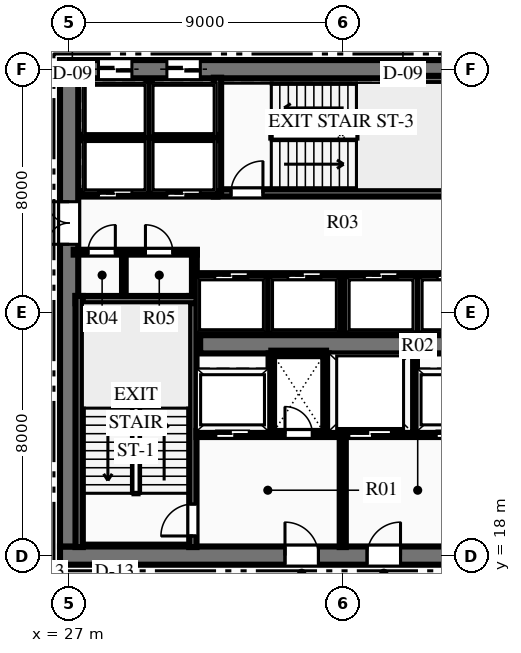
"""IFC4 building model, lengths in metres.
Left out: names, types, materials, properties, quantities, classifications, styles, units other than length and angle.
Written with IfcOpenShell. Run it as: python <this file> out.ifc"""

import sys

from ifc_helpers import new_model, si_unit, direction, frame, frame_2d, origin, place, context, subcontext, project, spatial, rectangle, extrude, element, fill, save


model = new_model("IFC4")
c1 = context("Model", 3, precision=1e-05, world=origin(), true_north=direction((0.0, 1.0)))
c2 = subcontext(c1, "Body", "Model", "MODEL_VIEW")
j1 = project(units=[si_unit("LENGTHUNIT", "METRE"), si_unit("PLANEANGLEUNIT", "RADIAN")], contexts=[c1])
p1 = place(None, origin())
s1 = spatial("IfcSite", under=j1, at=p1, CompositionType="ELEMENT")
p2 = place(p1, origin())
s2 = spatial("IfcBuilding", under=s1, at=p2, CompositionType="ELEMENT")
p3 = place(p2, frame((0.0, 0.0, 66.45)))
s3 = spatial("IfcBuildingStorey", under=s2, at=p3, CompositionType="ELEMENT", Elevation=66.45)
p4 = place(p3, frame((26.7, 18.0, 0.0), z_axis=(0.0, 0.0, 1.0), x_axis=(1.0, 0.0, 0.0)))
e1 = element("IfcWall", 1, at=p4, inside=s3, PredefinedType="SHEAR", context=c2, shape_type="SweptSolid", body=[
    extrude(rectangle(XDim=18.6, YDim=0.6, at=frame_2d((9.3, 0.0))), origin(), (0.0, 0.0, 1.0), 3.75),
])
p5 = place(p4, frame((7.4, 0.0, 0.0)))
e2 = element("IfcOpeningElement", 2, at=p5, cuts=e1, PredefinedType="OPENING", context=c2, shape_type="SweptSolid", body=[
    extrude(rectangle(XDim=1.1, YDim=2.15, at=frame_2d((0.55, 1.075))), frame((0.0, 0.31, 0.0), z_axis=(0.0, -1.0, 0.0), x_axis=(1.0, 0.0, 0.0)), (0.0, 0.0, 1.0), 0.62),
])
p6 = place(p4, frame((10.1, 0.0, 0.0)))
e3 = element("IfcOpeningElement", 3, at=p6, cuts=e1, PredefinedType="OPENING", context=c2, shape_type="SweptSolid", body=[
    extrude(rectangle(XDim=1.1, YDim=2.15, at=frame_2d((0.55, 1.075))), frame((0.0, 0.31, 0.0), z_axis=(0.0, -1.0, 0.0), x_axis=(1.0, 0.0, 0.0)), (0.0, 0.0, 1.0), 0.62),
])
p7 = place(p3, frame((26.7, 34.0, 0.0), z_axis=(0.0, 0.0, 1.0), x_axis=(1.0, 0.0, 0.0)))
e4 = element("IfcWall", 4, at=p7, inside=s3, PredefinedType="SHEAR", context=c2, shape_type="SweptSolid", body=[
    extrude(rectangle(XDim=18.6, YDim=0.6, at=frame_2d((9.3, 0.0))), origin(), (0.0, 0.0, 1.0), 3.75),
])
p8 = place(p7, frame((1.265, 0.0, 0.0)))
e5 = element("IfcOpeningElement", 5, at=p8, cuts=e4, PredefinedType="OPENING", context=c2, shape_type="SweptSolid", body=[
    extrude(rectangle(XDim=1.1, YDim=2.15, at=frame_2d((0.55, 1.075))), frame((0.0, 0.31, 0.0), z_axis=(0.0, -1.0, 0.0), x_axis=(1.0, 0.0, 0.0)), (0.0, 0.0, 1.0), 0.62),
])
p9 = place(p7, frame((3.515, 0.0, 0.0)))
e6 = element("IfcOpeningElement", 6, at=p9, cuts=e4, PredefinedType="OPENING", context=c2, shape_type="SweptSolid", body=[
    extrude(rectangle(XDim=1.1, YDim=2.15, at=frame_2d((0.55, 1.075))), frame((0.0, 0.31, 0.0), z_axis=(0.0, -1.0, 0.0), x_axis=(1.0, 0.0, 0.0)), (0.0, 0.0, 1.0), 0.62),
])
p10 = place(p7, frame((13.985, 0.0, 0.0)))
e7 = element("IfcOpeningElement", 7, at=p10, cuts=e4, PredefinedType="OPENING", context=c2, shape_type="SweptSolid", body=[
    extrude(rectangle(XDim=1.1, YDim=2.15, at=frame_2d((0.55, 1.075))), frame((0.0, 0.31, 0.0), z_axis=(0.0, -1.0, 0.0), x_axis=(1.0, 0.0, 0.0)), (0.0, 0.0, 1.0), 0.62),
])
p11 = place(p7, frame((16.235, 0.0, 0.0)))
e8 = element("IfcOpeningElement", 8, at=p11, cuts=e4, PredefinedType="OPENING", context=c2, shape_type="SweptSolid", body=[
    extrude(rectangle(XDim=1.1, YDim=2.15, at=frame_2d((0.55, 1.075))), frame((0.0, 0.31, 0.0), z_axis=(0.0, -1.0, 0.0), x_axis=(1.0, 0.0, 0.0)), (0.0, 0.0, 1.0), 0.62),
])
p12 = place(p3, frame((27.0, 18.3, 0.0), z_axis=(0.0, 0.0, 1.0), x_axis=(0.0, 1.0, 0.0)))
e9 = element("IfcWall", 9, at=p12, inside=s3, PredefinedType="SHEAR", context=c2, shape_type="SweptSolid", body=[
    extrude(rectangle(XDim=15.4, YDim=0.6, at=frame_2d((7.7, 0.0))), origin(), (0.0, 0.0, 1.0), 3.75),
])
p13 = place(p12, frame((9.94, 0.0, 0.0)))
e10 = element("IfcOpeningElement", 10, at=p13, cuts=e9, PredefinedType="OPENING", context=c2, shape_type="SweptSolid", body=[
    extrude(rectangle(XDim=1.4, YDim=2.2, at=frame_2d((0.7, 1.1))), frame((0.0, 0.31, 0.0), z_axis=(0.0, -1.0, 0.0), x_axis=(1.0, 0.0, 0.0)), (0.0, 0.0, 1.0), 0.62),
])
p14 = place(p3, frame((31.31, 24.95, 0.0), z_axis=(0.0, 0.0, 1.0), x_axis=(1.0, 0.0, 0.0)))
e11 = element("IfcWall", 11, at=p14, inside=s3, PredefinedType="SHEAR", context=c2, shape_type="SweptSolid", body=[
    extrude(rectangle(XDim=9.38, YDim=0.6, at=frame_2d((4.69, 0.0))), origin(), (0.0, 0.0, 1.0), 3.75),
])
p15 = place(p3, frame((31.07, 18.28, 0.0), z_axis=(0.0, 0.0, 1.0), x_axis=(0.0, 1.0, 0.0)))
e12 = element("IfcWall", 12, at=p15, inside=s3, PredefinedType="SHEAR", context=c2, shape_type="SweptSolid", body=[
    extrude(rectangle(XDim=8.26, YDim=0.24, at=frame_2d((4.13, 0.0))), origin(), (0.0, 0.0, 1.0), 3.75),
])
p16 = place(p15, frame((0.365, 0.0, 0.0)))
e13 = element("IfcOpeningElement", 13, at=p16, cuts=e12, PredefinedType="OPENING", context=c2, shape_type="SweptSolid", body=[
    extrude(rectangle(XDim=1.05, YDim=2.15, at=frame_2d((0.525, 1.075))), frame((0.0, 0.13, 0.0), z_axis=(0.0, -1.0, 0.0), x_axis=(1.0, 0.0, 0.0)), (0.0, 0.0, 1.0), 0.26),
])
p17 = place(p3, frame((27.21, 26.42, 0.0), z_axis=(0.0, 0.0, 1.0), x_axis=(1.0, 0.0, 0.0)))
e14 = element("IfcWall", 14, at=p17, inside=s3, PredefinedType="SHEAR", context=c2, shape_type="SweptSolid", body=[
    extrude(rectangle(XDim=3.98, YDim=0.24, at=frame_2d((1.99, 0.0))), origin(), (0.0, 0.0, 1.0), 3.75),
])
p18 = place(p3, frame((27.33, 18.28, 0.0), z_axis=(0.0, 0.0, 1.0), x_axis=(0.0, 1.0, 0.0)))
e15 = element("IfcWall", 15, at=p18, inside=s3, PredefinedType="SHEAR", context=c2, shape_type="SweptSolid", body=[
    extrude(rectangle(XDim=8.26, YDim=0.24, at=frame_2d((4.13, 0.0))), origin(), (0.0, 0.0, 1.0), 3.75),
])
p19 = place(p3, frame((31.76, 29.93, 0.0), z_axis=(0.0, 0.0, 1.0), x_axis=(1.0, 0.0, 0.0)))
e16 = element("IfcWall", 16, at=p19, inside=s3, PredefinedType="SHEAR", context=c2, shape_type="SweptSolid", body=[
    extrude(rectangle(XDim=8.38, YDim=0.24, at=frame_2d((4.19, 0.0))), origin(), (0.0, 0.0, 1.0), 3.75),
])
p20 = place(p19, frame((0.565, 0.0, 0.0)))
e17 = element("IfcOpeningElement", 17, at=p20, cuts=e16, PredefinedType="OPENING", context=c2, shape_type="SweptSolid", body=[
    extrude(rectangle(XDim=1.05, YDim=2.15, at=frame_2d((0.525, 1.075))), frame((0.0, 0.13, 0.0), z_axis=(0.0, -1.0, 0.0), x_axis=(1.0, 0.0, 0.0)), (0.0, 0.0, 1.0), 0.26),
])
p21 = place(p3, frame((31.88, 29.93, 0.0), z_axis=(0.0, 0.0, 1.0), x_axis=(0.0, 1.0, 0.0)))
e18 = element("IfcWall", 18, at=p21, inside=s3, PredefinedType="SHEAR", context=c2, shape_type="SweptSolid", body=[
    extrude(rectangle(XDim=3.79, YDim=0.24, at=frame_2d((1.895, 0.0))), origin(), (0.0, 0.0, 1.0), 3.75),
])
p22 = place(p3, frame((37.85, 33.66, 0.0), z_axis=(0.0, 0.0, 1.0), x_axis=(1.0, 0.0, 0.0)))
e19 = element("IfcWall", 19, at=p22, inside=s3, PredefinedType="SHEAR", context=c2, shape_type="SweptSolid", body=[
    extrude(rectangle(XDim=2.29, YDim=0.24, at=frame_2d((1.145, 0.0))), origin(), (0.0, 0.0, 1.0), 3.75),
])
p23 = place(p3, frame((36.0, 18.28, 0.0), z_axis=(0.0, 0.0, 1.0), x_axis=(0.0, 1.0, 0.0)))
e20 = element("IfcWall", 20, at=p23, inside=s3, PredefinedType="PARTITIONING", context=c2, shape_type="SweptSolid", body=[
    extrude(rectangle(XDim=3.77, YDim=0.2, at=frame_2d((1.885, 0.0))), origin(), (0.0, 0.0, 1.0), 3.44),
])
p24 = place(p3, frame((31.19, 22.0, 0.0), z_axis=(0.0, 0.0, 1.0), x_axis=(1.0, 0.0, 0.0)))
e21 = element("IfcWall", 21, at=p24, inside=s3, PredefinedType="PARTITIONING", context=c2, shape_type="SweptSolid", body=[
    extrude(rectangle(XDim=4.69, YDim=0.2, at=frame_2d((2.345, 0.0))), origin(), (0.0, 0.0, 1.0), 3.44),
])
p25 = place(p24, frame((2.91, 0.0, 0.0)))
e22 = element("IfcOpeningElement", 22, at=p25, cuts=e21, PredefinedType="OPENING", context=c2, shape_type="SweptSolid", body=[
    extrude(rectangle(XDim=0.9, YDim=2.15, at=frame_2d((0.45, 1.075))), frame((0.0, 0.11, 0.0), z_axis=(0.0, -1.0, 0.0), x_axis=(1.0, 0.0, 0.0)), (0.0, 0.0, 1.0), 0.22),
])
p26 = place(p24, frame((0.635, 0.0, 0.0)))
e23 = element("IfcOpeningElement", 23, at=p26, cuts=e21, PredefinedType="OPENING", context=c2, shape_type="SweptSolid", body=[
    extrude(rectangle(XDim=1.1, YDim=2.15, at=frame_2d((0.55, 1.075))), frame((0.0, 0.11, 0.0), z_axis=(0.0, -1.0, 0.0), x_axis=(1.0, 0.0, 0.0)), (0.0, 0.0, 1.0), 0.22),
])
p27 = place(p3, frame((36.12, 22.0, 0.0), z_axis=(0.0, 0.0, 1.0), x_axis=(1.0, 0.0, 0.0)))
e24 = element("IfcWall", 24, at=p27, inside=s3, PredefinedType="PARTITIONING", context=c2, shape_type="SweptSolid", body=[
    extrude(rectangle(XDim=4.69, YDim=0.2, at=frame_2d((2.345, 0.0))), origin(), (0.0, 0.0, 1.0), 3.44),
])
p28 = place(p27, frame((2.955, 0.0, 0.0)))
e25 = element("IfcOpeningElement", 25, at=p28, cuts=e24, PredefinedType="OPENING", context=c2, shape_type="SweptSolid", body=[
    extrude(rectangle(XDim=1.1, YDim=2.15, at=frame_2d((0.55, 1.075))), frame((0.0, 0.11, 0.0), z_axis=(0.0, -1.0, 0.0), x_axis=(1.0, 0.0, 0.0)), (0.0, 0.0, 1.0), 0.22),
])
p29 = place(p27, frame((0.08, 0.0, 0.0)))
e26 = element("IfcOpeningElement", 26, at=p29, cuts=e24, PredefinedType="OPENING", context=c2, shape_type="SweptSolid", body=[
    extrude(rectangle(XDim=1.4, YDim=2.2, at=frame_2d((0.7, 1.1))), frame((0.0, 0.11, 0.0), z_axis=(0.0, -1.0, 0.0), x_axis=(1.0, 0.0, 0.0)), (0.0, 0.0, 1.0), 0.22),
])
for number, where, z_axis, x_axis in (
    (27, (33.65, 22.05, 0.0), (0.0, 0.0, 1.0), (0.0, 1.0, 0.0)),
    (28, (35.45, 22.05, 0.0), (0.0, 0.0, 1.0), (0.0, 1.0, 0.0)),
):
    element("IfcWall", number, at=place(p3, frame(where, z_axis=z_axis, x_axis=x_axis)), inside=s3, PredefinedType="PARTITIONING", context=c2, shape_type="SweptSolid", body=[
        extrude(rectangle(XDim=2.6, YDim=0.18, at=frame_2d((1.3, 0.0))), origin(), (0.0, 0.0, 1.0), 3.44),
    ])
p30 = place(p3, frame((33.65, 24.65, 0.0), z_axis=(0.0, 0.0, 1.0), x_axis=(1.0, 0.0, 0.0)))
e29 = element("IfcWall", 29, at=p30, inside=s3, PredefinedType="PARTITIONING", context=c2, shape_type="SweptSolid", body=[
    extrude(rectangle(XDim=1.8, YDim=0.18, at=frame_2d((0.9, 0.0))), origin(), (0.0, 0.0, 1.0), 3.44),
])
p31 = place(p3, frame((38.35, 22.05, 0.0), z_axis=(0.0, 0.0, 1.0), x_axis=(0.0, 1.0, 0.0)))
e30 = element("IfcWall", 30, at=p31, inside=s3, PredefinedType="PARTITIONING", context=c2, shape_type="SweptSolid", body=[
    extrude(rectangle(XDim=2.6, YDim=0.18, at=frame_2d((1.3, 0.0))), origin(), (0.0, 0.0, 1.0), 3.44),
])
p32 = place(p3, frame((27.15, 27.98, 0.0), z_axis=(0.0, 0.0, 1.0), x_axis=(1.0, 0.0, 0.0)))
e31 = element("IfcWall", 31, at=p32, inside=s3, PredefinedType="PARTITIONING", context=c2, shape_type="SweptSolid", body=[
    extrude(rectangle(XDim=4.05, YDim=0.16, at=frame_2d((2.025, 0.0))), origin(), (0.0, 0.0, 1.0), 3.44),
])
p33 = place(p32, frame((0.47, 0.0, 0.0)))
e32 = element("IfcOpeningElement", 32, at=p33, cuts=e31, PredefinedType="OPENING", context=c2, shape_type="SweptSolid", body=[
    extrude(rectangle(XDim=0.9, YDim=2.15, at=frame_2d((0.45, 1.075))), frame((0.0, 0.09, 0.0), z_axis=(0.0, -1.0, 0.0), x_axis=(1.0, 0.0, 0.0)), (0.0, 0.0, 1.0), 0.18),
])
p34 = place(p32, frame((2.36, 0.0, 0.0)))
e33 = element("IfcOpeningElement", 33, at=p34, cuts=e31, PredefinedType="OPENING", context=c2, shape_type="SweptSolid", body=[
    extrude(rectangle(XDim=0.9, YDim=2.15, at=frame_2d((0.45, 1.075))), frame((0.0, 0.09, 0.0), z_axis=(0.0, -1.0, 0.0), x_axis=(1.0, 0.0, 0.0)), (0.0, 0.0, 1.0), 0.18),
])
p35 = place(p3, frame((31.12, 26.54, 0.0), z_axis=(0.0, 0.0, 1.0), x_axis=(0.0, 1.0, 0.0)))
e34 = element("IfcWall", 34, at=p35, inside=s3, PredefinedType="PARTITIONING", context=c2, shape_type="SweptSolid", body=[
    extrude(rectangle(XDim=1.51, YDim=0.16, at=frame_2d((0.755, 0.0))), origin(), (0.0, 0.0, 1.0), 3.44),
])
p36 = place(p3, frame((28.8, 26.54, 0.0), z_axis=(0.0, 0.0, 1.0), x_axis=(0.0, 1.0, 0.0)))
e35 = element("IfcWall", 35, at=p36, inside=s3, PredefinedType="PARTITIONING", context=c2, shape_type="SweptSolid", body=[
    extrude(rectangle(XDim=1.44, YDim=0.12, at=frame_2d((0.72, 0.0))), origin(), (0.0, 0.0, 1.0), 3.44),
])
p37 = place(p3, frame((27.45, 29.9, 0.0), z_axis=(0.0, 0.0, 1.0), x_axis=(1.0, 0.0, 0.0)))
e36 = element("IfcWall", 36, at=p37, inside=s3, PredefinedType="PARTITIONING", context=c2, shape_type="SweptSolid", body=[
    extrude(rectangle(XDim=4.43, YDim=0.18, at=frame_2d((2.215, 0.0))), origin(), (0.0, 0.0, 1.0), 3.44),
])
p38 = place(p37, frame((0.515, 0.0, 0.0)))
e37 = element("IfcOpeningElement", 37, at=p38, cuts=e36, PredefinedType="OPENING", context=c2, shape_type="SweptSolid", body=[
    extrude(rectangle(XDim=1.1, YDim=2.15, at=frame_2d((0.55, 1.075))), frame((0.0, 0.1, 0.0), z_axis=(0.0, -1.0, 0.0), x_axis=(1.0, 0.0, 0.0)), (0.0, 0.0, 1.0), 0.2),
])
p39 = place(p37, frame((2.765, 0.0, 0.0)))
e38 = element("IfcOpeningElement", 38, at=p39, cuts=e36, PredefinedType="OPENING", context=c2, shape_type="SweptSolid", body=[
    extrude(rectangle(XDim=1.1, YDim=2.15, at=frame_2d((0.55, 1.075))), frame((0.0, 0.1, 0.0), z_axis=(0.0, -1.0, 0.0), x_axis=(1.0, 0.0, 0.0)), (0.0, 0.0, 1.0), 0.2),
])
p40 = place(p3, frame((27.45, 31.75, 0.0), z_axis=(0.0, 0.0, 1.0), x_axis=(1.0, 0.0, 0.0)))
e39 = element("IfcWall", 39, at=p40, inside=s3, PredefinedType="PARTITIONING", context=c2, shape_type="SweptSolid", body=[
    extrude(rectangle(XDim=4.43, YDim=0.18, at=frame_2d((2.215, 0.0))), origin(), (0.0, 0.0, 1.0), 3.44),
])
p41 = place(p3, frame((29.63, 29.9, 0.0), z_axis=(0.0, 0.0, 1.0), x_axis=(0.0, 1.0, 0.0)))
e40 = element("IfcWall", 40, at=p41, inside=s3, PredefinedType="PARTITIONING", context=c2, shape_type="SweptSolid", body=[
    extrude(rectangle(XDim=3.75, YDim=0.18, at=frame_2d((1.875, 0.0))), origin(), (0.0, 0.0, 1.0), 3.44),
])
p42 = place(p3, frame((31.2, 27.2, 0.0), z_axis=(0.0, 0.0, 1.0), x_axis=(1.0, 0.0, 0.0)))
e41 = element("IfcWall", 41, at=p42, inside=s3, PredefinedType="PARTITIONING", context=c2, shape_type="SweptSolid", body=[
    extrude(rectangle(XDim=9.6, YDim=0.18, at=frame_2d((4.8, 0.0))), origin(), (0.0, 0.0, 1.0), 3.44),
])
p43 = place(p42, frame((0.59, 0.0, 0.0)))
e42 = element("IfcOpeningElement", 42, at=p43, cuts=e41, PredefinedType="OPENING", context=c2, shape_type="SweptSolid", body=[
    extrude(rectangle(XDim=1.1, YDim=2.15, at=frame_2d((0.55, 1.075))), frame((0.0, 0.1, 0.0), z_axis=(0.0, -1.0, 0.0), x_axis=(1.0, 0.0, 0.0)), (0.0, 0.0, 1.0), 0.2),
])
p44 = place(p42, frame((2.99, 0.0, 0.0)))
e43 = element("IfcOpeningElement", 43, at=p44, cuts=e41, PredefinedType="OPENING", context=c2, shape_type="SweptSolid", body=[
    extrude(rectangle(XDim=1.1, YDim=2.15, at=frame_2d((0.55, 1.075))), frame((0.0, 0.1, 0.0), z_axis=(0.0, -1.0, 0.0), x_axis=(1.0, 0.0, 0.0)), (0.0, 0.0, 1.0), 0.2),
])
p45 = place(p42, frame((5.51, 0.0, 0.0)))
e44 = element("IfcOpeningElement", 44, at=p45, cuts=e41, PredefinedType="OPENING", context=c2, shape_type="SweptSolid", body=[
    extrude(rectangle(XDim=1.1, YDim=2.15, at=frame_2d((0.55, 1.075))), frame((0.0, 0.1, 0.0), z_axis=(0.0, -1.0, 0.0), x_axis=(1.0, 0.0, 0.0)), (0.0, 0.0, 1.0), 0.2),
])
p46 = place(p42, frame((7.91, 0.0, 0.0)))
e45 = element("IfcOpeningElement", 45, at=p46, cuts=e41, PredefinedType="OPENING", context=c2, shape_type="SweptSolid", body=[
    extrude(rectangle(XDim=1.1, YDim=2.15, at=frame_2d((0.55, 1.075))), frame((0.0, 0.1, 0.0), z_axis=(0.0, -1.0, 0.0), x_axis=(1.0, 0.0, 0.0)), (0.0, 0.0, 1.0), 0.2),
])
for number, where, z_axis, x_axis in (
    (46, (33.54, 25.3, 0.0), (0.0, 0.0, 1.0), (0.0, 1.0, 0.0)),
    (47, (36.0, 25.3, 0.0), (0.0, 0.0, 1.0), (0.0, 1.0, 0.0)),
    (48, (38.46, 25.3, 0.0), (0.0, 0.0, 1.0), (0.0, 1.0, 0.0)),
):
    element("IfcWall", number, at=place(p3, frame(where, z_axis=z_axis, x_axis=x_axis)), inside=s3, PredefinedType="PARTITIONING", context=c2, shape_type="SweptSolid", body=[
        extrude(rectangle(XDim=1.9, YDim=0.18, at=frame_2d((0.95, 0.0))), origin(), (0.0, 0.0, 1.0), 3.44),
    ])
p47 = place(p33, origin())
e49 = element("IfcDoor", 49, at=p47, inside=s3, OperationType="SINGLE_SWING_RIGHT", PredefinedType="DOOR", context=c2, shape_type="SweptSolid", body=[
    extrude(rectangle(XDim=0.9, YDim=2.15, at=frame_2d((0.45, 1.075))), frame((0.0, 0.025, 0.0), z_axis=(0.0, -1.0, 0.0), x_axis=(1.0, 0.0, 0.0)), (0.0, 0.0, 1.0), 0.05),
])
fill(e32, e49)
p48 = place(p34, origin())
e50 = element("IfcDoor", 50, at=p48, inside=s3, OperationType="SINGLE_SWING_LEFT", PredefinedType="DOOR", context=c2, shape_type="SweptSolid", body=[
    extrude(rectangle(XDim=0.9, YDim=2.15, at=frame_2d((0.45, 1.075))), frame((0.0, 0.025, 0.0), z_axis=(0.0, -1.0, 0.0), x_axis=(1.0, 0.0, 0.0)), (0.0, 0.0, 1.0), 0.05),
])
fill(e33, e50)
p49 = place(p16, origin())
e51 = element("IfcDoor", 51, at=p49, inside=s3, OperationType="SINGLE_SWING_LEFT", PredefinedType="DOOR", context=c2, shape_type="SweptSolid", body=[
    extrude(rectangle(XDim=1.05, YDim=2.15, at=frame_2d((0.525, 1.075))), frame((0.0, 0.025, 0.0), z_axis=(0.0, -1.0, 0.0), x_axis=(1.0, 0.0, 0.0)), (0.0, 0.0, 1.0), 0.05),
])
fill(e13, e51)
p50 = place(p20, origin())
e52 = element("IfcDoor", 52, at=p50, inside=s3, OperationType="SINGLE_SWING_RIGHT", PredefinedType="DOOR", context=c2, shape_type="SweptSolid", body=[
    extrude(rectangle(XDim=1.05, YDim=2.15, at=frame_2d((0.525, 1.075))), frame((0.0, 0.025, 0.0), z_axis=(0.0, -1.0, 0.0), x_axis=(1.0, 0.0, 0.0)), (0.0, 0.0, 1.0), 0.05),
])
fill(e17, e52)
p51 = place(p5, origin())
e53 = element("IfcDoor", 53, at=p51, inside=s3, OperationType="SINGLE_SWING_LEFT", PredefinedType="DOOR", context=c2, shape_type="SweptSolid", body=[
    extrude(rectangle(XDim=1.1, YDim=2.15, at=frame_2d((0.55, 1.075))), frame((0.0, 0.025, 0.0), z_axis=(0.0, -1.0, 0.0), x_axis=(1.0, 0.0, 0.0)), (0.0, 0.0, 1.0), 0.05),
])
fill(e2, e53)
p52 = place(p6, origin())
e54 = element("IfcDoor", 54, at=p52, inside=s3, OperationType="SINGLE_SWING_RIGHT", PredefinedType="DOOR", context=c2, shape_type="SweptSolid", body=[
    extrude(rectangle(XDim=1.1, YDim=2.15, at=frame_2d((0.55, 1.075))), frame((0.0, 0.025, 0.0), z_axis=(0.0, -1.0, 0.0), x_axis=(1.0, 0.0, 0.0)), (0.0, 0.0, 1.0), 0.05),
])
fill(e3, e54)
p53 = place(p25, origin())
e55 = element("IfcDoor", 55, at=p53, inside=s3, OperationType="SINGLE_SWING_LEFT", PredefinedType="DOOR", context=c2, shape_type="SweptSolid", body=[
    extrude(rectangle(XDim=0.9, YDim=2.15, at=frame_2d((0.45, 1.075))), frame((0.0, 0.025, 0.0), z_axis=(0.0, -1.0, 0.0), x_axis=(1.0, 0.0, 0.0)), (0.0, 0.0, 1.0), 0.05),
])
fill(e22, e55)
p54 = place(p13, origin())
e56 = element("IfcDoor", 56, at=p54, inside=s3, OperationType="DOUBLE_DOOR_SINGLE_SWING", PredefinedType="DOOR", context=c2, shape_type="SweptSolid", body=[
    extrude(rectangle(XDim=1.4, YDim=2.2, at=frame_2d((0.7, 1.1))), frame((0.0, 0.025, 0.0), z_axis=(0.0, -1.0, 0.0), x_axis=(1.0, 0.0, 0.0)), (0.0, 0.0, 1.0), 0.05),
])
fill(e10, e56)
p55 = place(p38, origin())
e57 = element("IfcDoor", 57, at=p55, inside=s3, OperationType="SLIDING_TO_LEFT", PredefinedType="DOOR", context=c2, shape_type="SweptSolid", body=[
    extrude(rectangle(XDim=1.1, YDim=2.15, at=frame_2d((0.55, 1.075))), frame((0.0, 0.025, 0.0), z_axis=(0.0, -1.0, 0.0), x_axis=(1.0, 0.0, 0.0)), (0.0, 0.0, 1.0), 0.05),
])
fill(e37, e57)
p56 = place(p39, origin())
e58 = element("IfcDoor", 58, at=p56, inside=s3, OperationType="SLIDING_TO_LEFT", PredefinedType="DOOR", context=c2, shape_type="SweptSolid", body=[
    extrude(rectangle(XDim=1.1, YDim=2.15, at=frame_2d((0.55, 1.075))), frame((0.0, 0.025, 0.0), z_axis=(0.0, -1.0, 0.0), x_axis=(1.0, 0.0, 0.0)), (0.0, 0.0, 1.0), 0.05),
])
fill(e38, e58)
p57 = place(p8, origin())
e59 = element("IfcDoor", 59, at=p57, inside=s3, OperationType="SLIDING_TO_LEFT", PredefinedType="DOOR", context=c2, shape_type="SweptSolid", body=[
    extrude(rectangle(XDim=1.1, YDim=2.15, at=frame_2d((0.55, 1.075))), frame((0.0, 0.025, 0.0), z_axis=(0.0, -1.0, 0.0), x_axis=(1.0, 0.0, 0.0)), (0.0, 0.0, 1.0), 0.05),
])
fill(e5, e59)
p58 = place(p9, origin())
e60 = element("IfcDoor", 60, at=p58, inside=s3, OperationType="SLIDING_TO_LEFT", PredefinedType="DOOR", context=c2, shape_type="SweptSolid", body=[
    extrude(rectangle(XDim=1.1, YDim=2.15, at=frame_2d((0.55, 1.075))), frame((0.0, 0.025, 0.0), z_axis=(0.0, -1.0, 0.0), x_axis=(1.0, 0.0, 0.0)), (0.0, 0.0, 1.0), 0.05),
])
fill(e6, e60)
p59 = place(p43, origin())
e61 = element("IfcDoor", 61, at=p59, inside=s3, OperationType="SLIDING_TO_LEFT", PredefinedType="DOOR", context=c2, shape_type="SweptSolid", body=[
    extrude(rectangle(XDim=1.1, YDim=2.15, at=frame_2d((0.55, 1.075))), frame((0.0, 0.025, 0.0), z_axis=(0.0, -1.0, 0.0), x_axis=(1.0, 0.0, 0.0)), (0.0, 0.0, 1.0), 0.05),
])
fill(e42, e61)
p60 = place(p44, origin())
e62 = element("IfcDoor", 62, at=p60, inside=s3, OperationType="SLIDING_TO_LEFT", PredefinedType="DOOR", context=c2, shape_type="SweptSolid", body=[
    extrude(rectangle(XDim=1.1, YDim=2.15, at=frame_2d((0.55, 1.075))), frame((0.0, 0.025, 0.0), z_axis=(0.0, -1.0, 0.0), x_axis=(1.0, 0.0, 0.0)), (0.0, 0.0, 1.0), 0.05),
])
fill(e43, e62)
p61 = place(p45, origin())
e63 = element("IfcDoor", 63, at=p61, inside=s3, OperationType="SLIDING_TO_LEFT", PredefinedType="DOOR", context=c2, shape_type="SweptSolid", body=[
    extrude(rectangle(XDim=1.1, YDim=2.15, at=frame_2d((0.55, 1.075))), frame((0.0, 0.025, 0.0), z_axis=(0.0, -1.0, 0.0), x_axis=(1.0, 0.0, 0.0)), (0.0, 0.0, 1.0), 0.05),
])
fill(e44, e63)
p62 = place(p46, origin())
e64 = element("IfcDoor", 64, at=p62, inside=s3, OperationType="SLIDING_TO_LEFT", PredefinedType="DOOR", context=c2, shape_type="SweptSolid", body=[
    extrude(rectangle(XDim=1.1, YDim=2.15, at=frame_2d((0.55, 1.075))), frame((0.0, 0.025, 0.0), z_axis=(0.0, -1.0, 0.0), x_axis=(1.0, 0.0, 0.0)), (0.0, 0.0, 1.0), 0.05),
])
fill(e45, e64)
p63 = place(p26, origin())
e65 = element("IfcDoor", 65, at=p63, inside=s3, OperationType="SLIDING_TO_LEFT", PredefinedType="DOOR", context=c2, shape_type="SweptSolid", body=[
    extrude(rectangle(XDim=1.1, YDim=2.15, at=frame_2d((0.55, 1.075))), frame((0.0, 0.025, 0.0), z_axis=(0.0, -1.0, 0.0), x_axis=(1.0, 0.0, 0.0)), (0.0, 0.0, 1.0), 0.05),
])
fill(e23, e65)
p64 = place(p28, origin())
e66 = element("IfcDoor", 66, at=p64, inside=s3, OperationType="SLIDING_TO_LEFT", PredefinedType="DOOR", context=c2, shape_type="SweptSolid", body=[
    extrude(rectangle(XDim=1.1, YDim=2.15, at=frame_2d((0.55, 1.075))), frame((0.0, 0.025, 0.0), z_axis=(0.0, -1.0, 0.0), x_axis=(1.0, 0.0, 0.0)), (0.0, 0.0, 1.0), 0.05),
])
fill(e25, e66)
p65 = place(p29, origin())
e67 = element("IfcDoor", 67, at=p65, inside=s3, OperationType="SLIDING_TO_LEFT", PredefinedType="DOOR", context=c2, shape_type="SweptSolid", body=[
    extrude(rectangle(XDim=1.4, YDim=2.2, at=frame_2d((0.7, 1.1))), frame((0.0, 0.025, 0.0), z_axis=(0.0, -1.0, 0.0), x_axis=(1.0, 0.0, 0.0)), (0.0, 0.0, 1.0), 0.05),
])
fill(e26, e67)
save(model, sys.argv[1])
